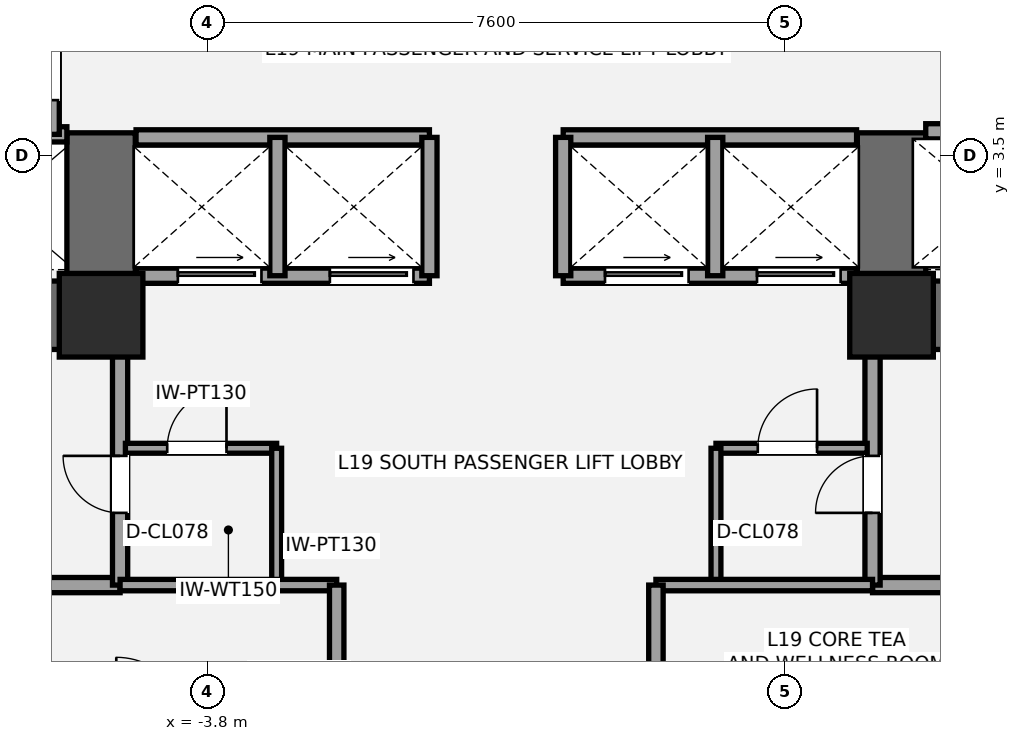
"""IFC4 building model, lengths in metres.
Left out: names, types, materials, properties, quantities, classifications, styles, units other than length and angle.
Written with IfcOpenShell. Run it as: python <this file> out.ifc"""

import sys

from ifc_helpers import new_model, si_unit, direction, frame, frame_2d, origin, origin_2d, place, context, subcontext, project, spatial, rectangle, extrude, element, fill, save


model = new_model("IFC4")
c1 = context("Model", 3, precision=1e-05, world=origin(), true_north=direction((0.0, 1.0)))
c2 = subcontext(c1, "Body", "Model", "MODEL_VIEW")
j1 = project(units=[si_unit("LENGTHUNIT", "METRE"), si_unit("PLANEANGLEUNIT", "RADIAN")], contexts=[c1])
p1 = place(None, origin())
s1 = spatial("IfcSite", under=j1, at=p1, CompositionType="ELEMENT")
p2 = place(p1, origin())
s2 = spatial("IfcBuilding", under=s1, at=p2, CompositionType="ELEMENT")
p3 = place(p2, frame((0.0, 0.0, 73.8)))
s3 = spatial("IfcBuildingStorey", under=s2, at=p3, CompositionType="ELEMENT", Elevation=73.8)
p4 = place(p3, frame((-4.75, 1.4, 0.0), z_axis=(0.0, 0.0, 1.0), x_axis=(-1.0, 0.0, 0.0)))
e1 = element("IfcWall", 1, at=p4, inside=s3, PredefinedType="SHEAR", context=c2, shape_type="SweptSolid", body=[
    extrude(rectangle(XDim=9.3, YDim=0.9, at=frame_2d((4.65, 0.0))), origin(), (0.0, 0.0, 1.0), 3.6),
])
p5 = place(p4, frame((5.55, 0.0, 0.0)))
e2 = element("IfcOpeningElement", 2, at=p5, cuts=e1, PredefinedType="OPENING", context=c2, shape_type="SweptSolid", body=[
    extrude(rectangle(XDim=1.05, YDim=2.15, at=frame_2d((0.525, 1.075))), frame((0.0, 0.46, 0.0), z_axis=(0.0, -1.0, 0.0), x_axis=(1.0, 0.0, 0.0)), (0.0, 0.0, 1.0), 0.92),
])
p6 = place(p4, frame((3.88, 0.0, 0.0)))
e3 = element("IfcOpeningElement", 3, at=p6, cuts=e1, PredefinedType="OPENING", context=c2, shape_type="SweptSolid", body=[
    extrude(rectangle(XDim=1.1, YDim=2.2, at=frame_2d((0.55, 1.1))), frame((0.0, 0.46, 0.0), z_axis=(0.0, -1.0, 0.0), x_axis=(1.0, 0.0, 0.0)), (0.0, 0.0, 1.0), 0.92),
])
p7 = place(p3, frame((-5.2, 0.95, 0.0), z_axis=(0.0, 0.0, 1.0), x_axis=(0.0, 1.0, 0.0)))
e4 = element("IfcWall", 4, at=p7, inside=s3, PredefinedType="SHEAR", context=c2, shape_type="SweptSolid", body=[
    extrude(rectangle(XDim=2.85, YDim=0.9, at=frame_2d((1.425, 0.0))), origin(), (0.0, 0.0, 1.0), 3.6),
])
p8 = place(p3, frame((14.05, 1.4, 0.0), z_axis=(0.0, 0.0, 1.0), x_axis=(-1.0, 0.0, 0.0)))
e5 = element("IfcWall", 5, at=p8, inside=s3, PredefinedType="SHEAR", context=c2, shape_type="SweptSolid", body=[
    extrude(rectangle(XDim=9.3, YDim=0.9, at=frame_2d((4.65, 0.0))), origin(), (0.0, 0.0, 1.0), 3.6),
])
p9 = place(p8, frame((2.7, 0.0, 0.0)))
e6 = element("IfcOpeningElement", 6, at=p9, cuts=e5, PredefinedType="OPENING", context=c2, shape_type="SweptSolid", body=[
    extrude(rectangle(XDim=1.05, YDim=2.15, at=frame_2d((0.525, 1.075))), frame((0.0, 0.46, 0.0), z_axis=(0.0, -1.0, 0.0), x_axis=(1.0, 0.0, 0.0)), (0.0, 0.0, 1.0), 0.92),
])
p10 = place(p8, frame((4.7, 0.0, 0.0)))
e7 = element("IfcOpeningElement", 7, at=p10, cuts=e5, PredefinedType="OPENING", context=c2, shape_type="SweptSolid", body=[
    extrude(rectangle(XDim=1.1, YDim=2.2, at=frame_2d((0.55, 1.1))), frame((0.0, 0.46, 0.0), z_axis=(0.0, -1.0, 0.0), x_axis=(1.0, 0.0, 0.0)), (0.0, 0.0, 1.0), 0.92),
])
p11 = place(p3, frame((5.2, 0.95, 0.0), z_axis=(0.0, 0.0, 1.0), x_axis=(0.0, 1.0, 0.0)))
e8 = element("IfcWall", 8, at=p11, inside=s3, PredefinedType="SHEAR", context=c2, shape_type="SweptSolid", body=[
    extrude(rectangle(XDim=2.85, YDim=0.9, at=frame_2d((1.425, 0.0))), origin(), (0.0, 0.0, 1.0), 3.6),
])
for number, where, z_axis, x_axis in (
    (9, (-5.2, 1.4, 0.0), (0.0, 0.0, 1.0), (1.0, 0.0, 0.0)),
    (10, (5.2, 1.4, 0.0), (0.0, 0.0, 1.0), (1.0, 0.0, 0.0)),
):
    element("IfcColumn", number, at=place(p3, frame(where, z_axis=z_axis, x_axis=x_axis)), inside=s3, PredefinedType="COLUMN", context=c2, shape_type="SweptSolid", body=[
        extrude(rectangle(XDim=1.1, YDim=1.1, at=origin_2d()), origin(), (0.0, 0.0, 1.0), 3.6),
    ])
p12 = place(p3, frame((-7.2, -2.15, 0.0), z_axis=(0.0, 0.0, 1.0), x_axis=(1.0, 0.0, 0.0)))
e11 = element("IfcWall", 11, at=p12, inside=s3, PredefinedType="SOLIDWALL", context=c2, shape_type="SweptSolid", body=[
    extrude(rectangle(XDim=2.25, YDim=0.2, at=frame_2d((1.125, 0.0))), origin(), (0.0, 0.0, 1.0), 3.36),
])
p13 = place(p3, frame((-4.95, -2.15, 0.0), z_axis=(0.0, 0.0, 1.0), x_axis=(0.0, 1.0, 0.0)))
e12 = element("IfcWall", 12, at=p13, inside=s3, PredefinedType="SOLIDWALL", context=c2, shape_type="SweptSolid", body=[
    extrude(rectangle(XDim=3.15, YDim=0.2, at=frame_2d((1.575, 0.0))), origin(), (0.0, 0.0, 1.0), 2.813),
])
p14 = place(p13, frame((0.95, 0.0, 0.0)))
e13 = element("IfcOpeningElement", 13, at=p14, cuts=e12, PredefinedType="OPENING", context=c2, shape_type="SweptSolid", body=[
    extrude(rectangle(XDim=0.75, YDim=2.1, at=frame_2d((0.375, 1.05))), frame((0.0, 0.11, 0.0), z_axis=(0.0, -1.0, 0.0), x_axis=(1.0, 0.0, 0.0)), (0.0, 0.0, 1.0), 0.22),
])
p15 = place(p3, frame((4.95, -2.15, 0.0), z_axis=(0.0, 0.0, 1.0), x_axis=(1.0, 0.0, 0.0)))
e14 = element("IfcWall", 14, at=p15, inside=s3, PredefinedType="SOLIDWALL", context=c2, shape_type="SweptSolid", body=[
    extrude(rectangle(XDim=2.25, YDim=0.2, at=frame_2d((1.125, 0.0))), origin(), (0.0, 0.0, 1.0), 3.36),
])
p16 = place(p3, frame((4.95, -2.15, 0.0), z_axis=(0.0, 0.0, 1.0), x_axis=(0.0, 1.0, 0.0)))
e15 = element("IfcWall", 15, at=p16, inside=s3, PredefinedType="SOLIDWALL", context=c2, shape_type="SweptSolid", body=[
    extrude(rectangle(XDim=3.15, YDim=0.2, at=frame_2d((1.575, 0.0))), origin(), (0.0, 0.0, 1.0), 2.813),
])
p17 = place(p16, frame((0.95, 0.0, 0.0)))
e16 = element("IfcOpeningElement", 16, at=p17, cuts=e15, PredefinedType="OPENING", context=c2, shape_type="SweptSolid", body=[
    extrude(rectangle(XDim=0.75, YDim=2.1, at=frame_2d((0.375, 1.05))), frame((0.0, 0.11, 0.0), z_axis=(0.0, -1.0, 0.0), x_axis=(1.0, 0.0, 0.0)), (0.0, 0.0, 1.0), 0.22),
])
p18 = place(p3, frame((-4.88, -0.35, 0.0), z_axis=(0.0, 0.0, 1.0), x_axis=(1.0, 0.0, 0.0)))
e17 = element("IfcWall", 17, at=p18, inside=s3, PredefinedType="PARTITIONING", context=c2, shape_type="SweptSolid", body=[
    extrude(rectangle(XDim=1.99, YDim=0.13, at=frame_2d((0.995, 0.0))), origin(), (0.0, 0.0, 1.0), 3.36),
])
p19 = place(p18, frame((0.55, 0.0, 0.0)))
e18 = element("IfcOpeningElement", 18, at=p19, cuts=e17, PredefinedType="OPENING", context=c2, shape_type="SweptSolid", body=[
    extrude(rectangle(XDim=0.78, YDim=2.1, at=frame_2d((0.39, 1.05))), frame((0.0, 0.075, 0.0), z_axis=(0.0, -1.0, 0.0), x_axis=(1.0, 0.0, 0.0)), (0.0, 0.0, 1.0), 0.15),
])
p20 = place(p3, frame((-2.89, -2.15, 0.0), z_axis=(0.0, 0.0, 1.0), x_axis=(0.0, 1.0, 0.0)))
e19 = element("IfcWall", 19, at=p20, inside=s3, PredefinedType="PARTITIONING", context=c2, shape_type="SweptSolid", body=[
    extrude(rectangle(XDim=1.8, YDim=0.13, at=frame_2d((0.9, 0.0))), origin(), (0.0, 0.0, 1.0), 3.36),
])
p21 = place(p3, frame((2.89, -0.35, 0.0), z_axis=(0.0, 0.0, 1.0), x_axis=(1.0, 0.0, 0.0)))
e20 = element("IfcWall", 20, at=p21, inside=s3, PredefinedType="PARTITIONING", context=c2, shape_type="SweptSolid", body=[
    extrude(rectangle(XDim=1.99, YDim=0.13, at=frame_2d((0.995, 0.0))), origin(), (0.0, 0.0, 1.0), 3.36),
])
p22 = place(p21, frame((0.55, 0.0, 0.0)))
e21 = element("IfcOpeningElement", 21, at=p22, cuts=e20, PredefinedType="OPENING", context=c2, shape_type="SweptSolid", body=[
    extrude(rectangle(XDim=0.78, YDim=2.1, at=frame_2d((0.39, 1.05))), frame((0.0, 0.075, 0.0), z_axis=(0.0, -1.0, 0.0), x_axis=(1.0, 0.0, 0.0)), (0.0, 0.0, 1.0), 0.15),
])
p23 = place(p3, frame((2.89, -2.15, 0.0), z_axis=(0.0, 0.0, 1.0), x_axis=(0.0, 1.0, 0.0)))
e22 = element("IfcWall", 22, at=p23, inside=s3, PredefinedType="PARTITIONING", context=c2, shape_type="SweptSolid", body=[
    extrude(rectangle(XDim=1.8, YDim=0.13, at=frame_2d((0.9, 0.0))), origin(), (0.0, 0.0, 1.0), 3.36),
])
p24 = place(p3, frame((-9.78, 3.78, 0.0), z_axis=(0.0, 0.0, 1.0), x_axis=(1.0, 0.0, 0.0)))
e23 = element("IfcWall", 23, at=p24, inside=s3, PredefinedType="SOLIDWALL", context=c2, shape_type="SweptSolid", body=[
    extrude(rectangle(XDim=4.13, YDim=0.2, at=frame_2d((2.065, 0.0))), origin(), (0.0, 0.0, 1.0), 3.36),
])
p25 = place(p3, frame((-5.85, 3.78, 0.0), z_axis=(0.0, 0.0, 1.0), x_axis=(0.0, 1.0, 0.0)))
e24 = element("IfcWall", 24, at=p25, inside=s3, PredefinedType="SOLIDWALL", context=c2, shape_type="SweptSolid", body=[
    extrude(rectangle(XDim=1.69, YDim=0.2, at=frame_2d((0.845, 0.0))), origin(), (0.0, 0.0, 1.0), 3.36),
])
p26 = place(p25, frame((0.45, 0.0, 0.0)))
e25 = element("IfcOpeningElement", 25, at=p26, cuts=e24, PredefinedType="OPENING", context=c2, shape_type="SweptSolid", body=[
    extrude(rectangle(XDim=0.75, YDim=2.1, at=frame_2d((0.375, 1.05))), frame((0.0, 0.11, 0.0), z_axis=(0.0, -1.0, 0.0), x_axis=(1.0, 0.0, 0.0)), (0.0, 0.0, 1.0), 0.22),
])
p27 = place(p3, frame((5.65, 3.82, 0.0), z_axis=(0.0, 0.0, 1.0), x_axis=(1.0, 0.0, 0.0)))
e26 = element("IfcWall", 26, at=p27, inside=s3, PredefinedType="SOLIDWALL", context=c2, shape_type="SweptSolid", body=[
    extrude(rectangle(XDim=4.13, YDim=0.2, at=frame_2d((2.065, 0.0))), origin(), (0.0, 0.0, 1.0), 3.36),
])
p28 = place(p27, frame((0.65, 0.0, 0.0)))
e27 = element("IfcOpeningElement", 27, at=p28, cuts=e26, PredefinedType="OPENING", context=c2, shape_type="SweptSolid", body=[
    extrude(rectangle(XDim=1.2, YDim=2.2, at=frame_2d((0.6, 1.1))), frame((0.0, 0.11, 0.0), z_axis=(0.0, -1.0, 0.0), x_axis=(1.0, 0.0, 0.0)), (0.0, 0.0, 1.0), 0.22),
])
p29 = place(p3, frame((-4.74, 1.92, 0.0), z_axis=(0.0, 0.0, 1.0), x_axis=(1.0, 0.0, 0.0)))
e28 = element("IfcWall", 28, at=p29, inside=s3, PredefinedType="SOLIDWALL", context=c2, shape_type="SweptSolid", body=[
    extrude(rectangle(XDim=3.86, YDim=0.2, at=frame_2d((1.93, 0.0))), origin(), (0.0, 0.0, 1.0), 2.35),
])
p30 = place(p29, frame((0.55, 0.0, 0.0)))
e29 = element("IfcOpeningElement", 29, at=p30, cuts=e28, PredefinedType="OPENING", context=c2, shape_type="SweptSolid", body=[
    extrude(rectangle(XDim=1.1, YDim=2.2, at=frame_2d((0.55, 1.1))), frame((0.0, 0.11, 0.0), z_axis=(0.0, -1.0, 0.0), x_axis=(1.0, 0.0, 0.0)), (0.0, 0.0, 1.0), 0.22),
])
p31 = place(p29, frame((2.55, 0.0, 0.0)))
e30 = element("IfcOpeningElement", 30, at=p31, cuts=e28, PredefinedType="OPENING", context=c2, shape_type="SweptSolid", body=[
    extrude(rectangle(XDim=1.1, YDim=2.2, at=frame_2d((0.55, 1.1))), frame((0.0, 0.11, 0.0), z_axis=(0.0, -1.0, 0.0), x_axis=(1.0, 0.0, 0.0)), (0.0, 0.0, 1.0), 0.22),
])
p32 = place(p3, frame((0.88, 1.92, 0.0), z_axis=(0.0, 0.0, 1.0), x_axis=(1.0, 0.0, 0.0)))
e31 = element("IfcWall", 31, at=p32, inside=s3, PredefinedType="SOLIDWALL", context=c2, shape_type="SweptSolid", body=[
    extrude(rectangle(XDim=3.86, YDim=0.2, at=frame_2d((1.93, 0.0))), origin(), (0.0, 0.0, 1.0), 2.35),
])
p33 = place(p32, frame((0.55, 0.0, 0.0)))
e32 = element("IfcOpeningElement", 32, at=p33, cuts=e31, PredefinedType="OPENING", context=c2, shape_type="SweptSolid", body=[
    extrude(rectangle(XDim=1.1, YDim=2.2, at=frame_2d((0.55, 1.1))), frame((0.0, 0.11, 0.0), z_axis=(0.0, -1.0, 0.0), x_axis=(1.0, 0.0, 0.0)), (0.0, 0.0, 1.0), 0.22),
])
p34 = place(p32, frame((2.55, 0.0, 0.0)))
e33 = element("IfcOpeningElement", 33, at=p34, cuts=e31, PredefinedType="OPENING", context=c2, shape_type="SweptSolid", body=[
    extrude(rectangle(XDim=1.1, YDim=2.2, at=frame_2d((0.55, 1.1))), frame((0.0, 0.11, 0.0), z_axis=(0.0, -1.0, 0.0), x_axis=(1.0, 0.0, 0.0)), (0.0, 0.0, 1.0), 0.22),
])
for number, where, z_axis, x_axis in (
    (34, (-4.74, 3.74, 0.0), (0.0, 0.0, 1.0), (1.0, 0.0, 0.0)),
    (35, (0.88, 3.74, 0.0), (0.0, 0.0, 1.0), (1.0, 0.0, 0.0)),
):
    element("IfcWall", number, at=place(p3, frame(where, z_axis=z_axis, x_axis=x_axis)), inside=s3, PredefinedType="SOLIDWALL", context=c2, shape_type="SweptSolid", body=[
        extrude(rectangle(XDim=3.86, YDim=0.2, at=frame_2d((1.93, 0.0))), origin(), (0.0, 0.0, 1.0), 3.36),
    ])
for number, where, z_axis, x_axis in (
    (36, (-2.88, 1.92, 0.0), (0.0, 0.0, 1.0), (0.0, 1.0, 0.0)),
    (37, (2.88, 1.92, 0.0), (0.0, 0.0, 1.0), (0.0, 1.0, 0.0)),
    (38, (-0.88, 1.92, 0.0), (0.0, 0.0, 1.0), (0.0, 1.0, 0.0)),
    (39, (0.88, 1.92, 0.0), (0.0, 0.0, 1.0), (0.0, 1.0, 0.0)),
):
    element("IfcWall", number, at=place(p3, frame(where, z_axis=z_axis, x_axis=x_axis)), inside=s3, PredefinedType="SOLIDWALL", context=c2, shape_type="SweptSolid", body=[
        extrude(rectangle(XDim=1.82, YDim=0.2, at=frame_2d((0.91, 0.0))), origin(), (0.0, 0.0, 1.0), 3.36),
    ])
p35 = place(p3, frame((-4.95, -2.15, 0.0), z_axis=(0.0, 0.0, 1.0), x_axis=(1.0, 0.0, 0.0)))
e40 = element("IfcWall", 40, at=p35, inside=s3, PredefinedType="PLUMBINGWALL", context=c2, shape_type="SweptSolid", body=[
    extrude(rectangle(XDim=2.85, YDim=0.15, at=frame_2d((1.425, 0.0))), origin(), (0.0, 0.0, 1.0), 3.36),
])
p36 = place(p3, frame((-2.1, -4.05, 0.0), z_axis=(0.0, 0.0, 1.0), x_axis=(0.0, 1.0, 0.0)))
e41 = element("IfcWall", 41, at=p36, inside=s3, PredefinedType="PLUMBINGWALL", context=c2, shape_type="SweptSolid", body=[
    extrude(rectangle(XDim=1.9, YDim=0.19, at=frame_2d((0.95, 0.0))), origin(), (0.0, 0.0, 1.0), 3.36),
])
p37 = place(p3, frame((2.1, -2.15, 0.0), z_axis=(0.0, 0.0, 1.0), x_axis=(1.0, 0.0, 0.0)))
e42 = element("IfcWall", 42, at=p37, inside=s3, PredefinedType="PLUMBINGWALL", context=c2, shape_type="SweptSolid", body=[
    extrude(rectangle(XDim=2.85, YDim=0.15, at=frame_2d((1.425, 0.0))), origin(), (0.0, 0.0, 1.0), 3.36),
])
p38 = place(p3, frame((2.1, -4.05, 0.0), z_axis=(0.0, 0.0, 1.0), x_axis=(0.0, 1.0, 0.0)))
e43 = element("IfcWall", 43, at=p38, inside=s3, PredefinedType="PLUMBINGWALL", context=c2, shape_type="SweptSolid", body=[
    extrude(rectangle(XDim=1.9, YDim=0.19, at=frame_2d((0.95, 0.0))), origin(), (0.0, 0.0, 1.0), 3.36),
])
p39 = place(p14, origin())
e44 = element("IfcDoor", 44, at=p39, inside=s3, OperationType="SINGLE_SWING_RIGHT", PredefinedType="DOOR", context=c2, shape_type="SweptSolid", body=[
    extrude(rectangle(XDim=0.75, YDim=2.1, at=frame_2d((0.375, 1.05))), frame((0.0, 0.025, 0.0), z_axis=(0.0, -1.0, 0.0), x_axis=(1.0, 0.0, 0.0)), (0.0, 0.0, 1.0), 0.05),
])
fill(e13, e44)
p40 = place(p17, origin())
e45 = element("IfcDoor", 45, at=p40, inside=s3, OperationType="SINGLE_SWING_LEFT", PredefinedType="DOOR", context=c2, shape_type="SweptSolid", body=[
    extrude(rectangle(XDim=0.75, YDim=2.1, at=frame_2d((0.375, 1.05))), frame((0.0, 0.025, 0.0), z_axis=(0.0, -1.0, 0.0), x_axis=(1.0, 0.0, 0.0)), (0.0, 0.0, 1.0), 0.05),
])
fill(e16, e45)
p41 = place(p19, origin())
e46 = element("IfcDoor", 46, at=p41, inside=s3, OperationType="SINGLE_SWING_RIGHT", PredefinedType="DOOR", context=c2, shape_type="SweptSolid", body=[
    extrude(rectangle(XDim=0.78, YDim=2.1, at=frame_2d((0.39, 1.05))), frame((0.0, 0.025, 0.0), z_axis=(0.0, -1.0, 0.0), x_axis=(1.0, 0.0, 0.0)), (0.0, 0.0, 1.0), 0.05),
])
fill(e18, e46)
p42 = place(p22, origin())
e47 = element("IfcDoor", 47, at=p42, inside=s3, OperationType="SINGLE_SWING_RIGHT", PredefinedType="DOOR", context=c2, shape_type="SweptSolid", body=[
    extrude(rectangle(XDim=0.78, YDim=2.1, at=frame_2d((0.39, 1.05))), frame((0.0, 0.025, 0.0), z_axis=(0.0, -1.0, 0.0), x_axis=(1.0, 0.0, 0.0)), (0.0, 0.0, 1.0), 0.05),
])
fill(e21, e47)
p43 = place(p26, origin())
e48 = element("IfcDoor", 48, at=p43, inside=s3, OperationType="SINGLE_SWING_RIGHT", PredefinedType="DOOR", context=c2, shape_type="SweptSolid", body=[
    extrude(rectangle(XDim=0.75, YDim=2.1, at=frame_2d((0.375, 1.05))), frame((0.0, 0.025, 0.0), z_axis=(0.0, -1.0, 0.0), x_axis=(1.0, 0.0, 0.0)), (0.0, 0.0, 1.0), 0.05),
])
fill(e25, e48)
p44 = place(p30, origin())
e49 = element("IfcDoor", 49, at=p44, inside=s3, OperationType="SLIDING_TO_LEFT", PredefinedType="DOOR", context=c2, shape_type="SweptSolid", body=[
    extrude(rectangle(XDim=1.1, YDim=2.2, at=frame_2d((0.55, 1.1))), frame((0.0, 0.025, 0.0), z_axis=(0.0, -1.0, 0.0), x_axis=(1.0, 0.0, 0.0)), (0.0, 0.0, 1.0), 0.05),
])
fill(e29, e49)
p45 = place(p31, origin())
e50 = element("IfcDoor", 50, at=p45, inside=s3, OperationType="SLIDING_TO_LEFT", PredefinedType="DOOR", context=c2, shape_type="SweptSolid", body=[
    extrude(rectangle(XDim=1.1, YDim=2.2, at=frame_2d((0.55, 1.1))), frame((0.0, 0.025, 0.0), z_axis=(0.0, -1.0, 0.0), x_axis=(1.0, 0.0, 0.0)), (0.0, 0.0, 1.0), 0.05),
])
fill(e30, e50)
p46 = place(p33, origin())
e51 = element("IfcDoor", 51, at=p46, inside=s3, OperationType="SLIDING_TO_LEFT", PredefinedType="DOOR", context=c2, shape_type="SweptSolid", body=[
    extrude(rectangle(XDim=1.1, YDim=2.2, at=frame_2d((0.55, 1.1))), frame((0.0, 0.025, 0.0), z_axis=(0.0, -1.0, 0.0), x_axis=(1.0, 0.0, 0.0)), (0.0, 0.0, 1.0), 0.05),
])
fill(e32, e51)
p47 = place(p34, origin())
e52 = element("IfcDoor", 52, at=p47, inside=s3, OperationType="SLIDING_TO_LEFT", PredefinedType="DOOR", context=c2, shape_type="SweptSolid", body=[
    extrude(rectangle(XDim=1.1, YDim=2.2, at=frame_2d((0.55, 1.1))), frame((0.0, 0.025, 0.0), z_axis=(0.0, -1.0, 0.0), x_axis=(1.0, 0.0, 0.0)), (0.0, 0.0, 1.0), 0.05),
])
fill(e33, e52)
save(model, sys.argv[1])
